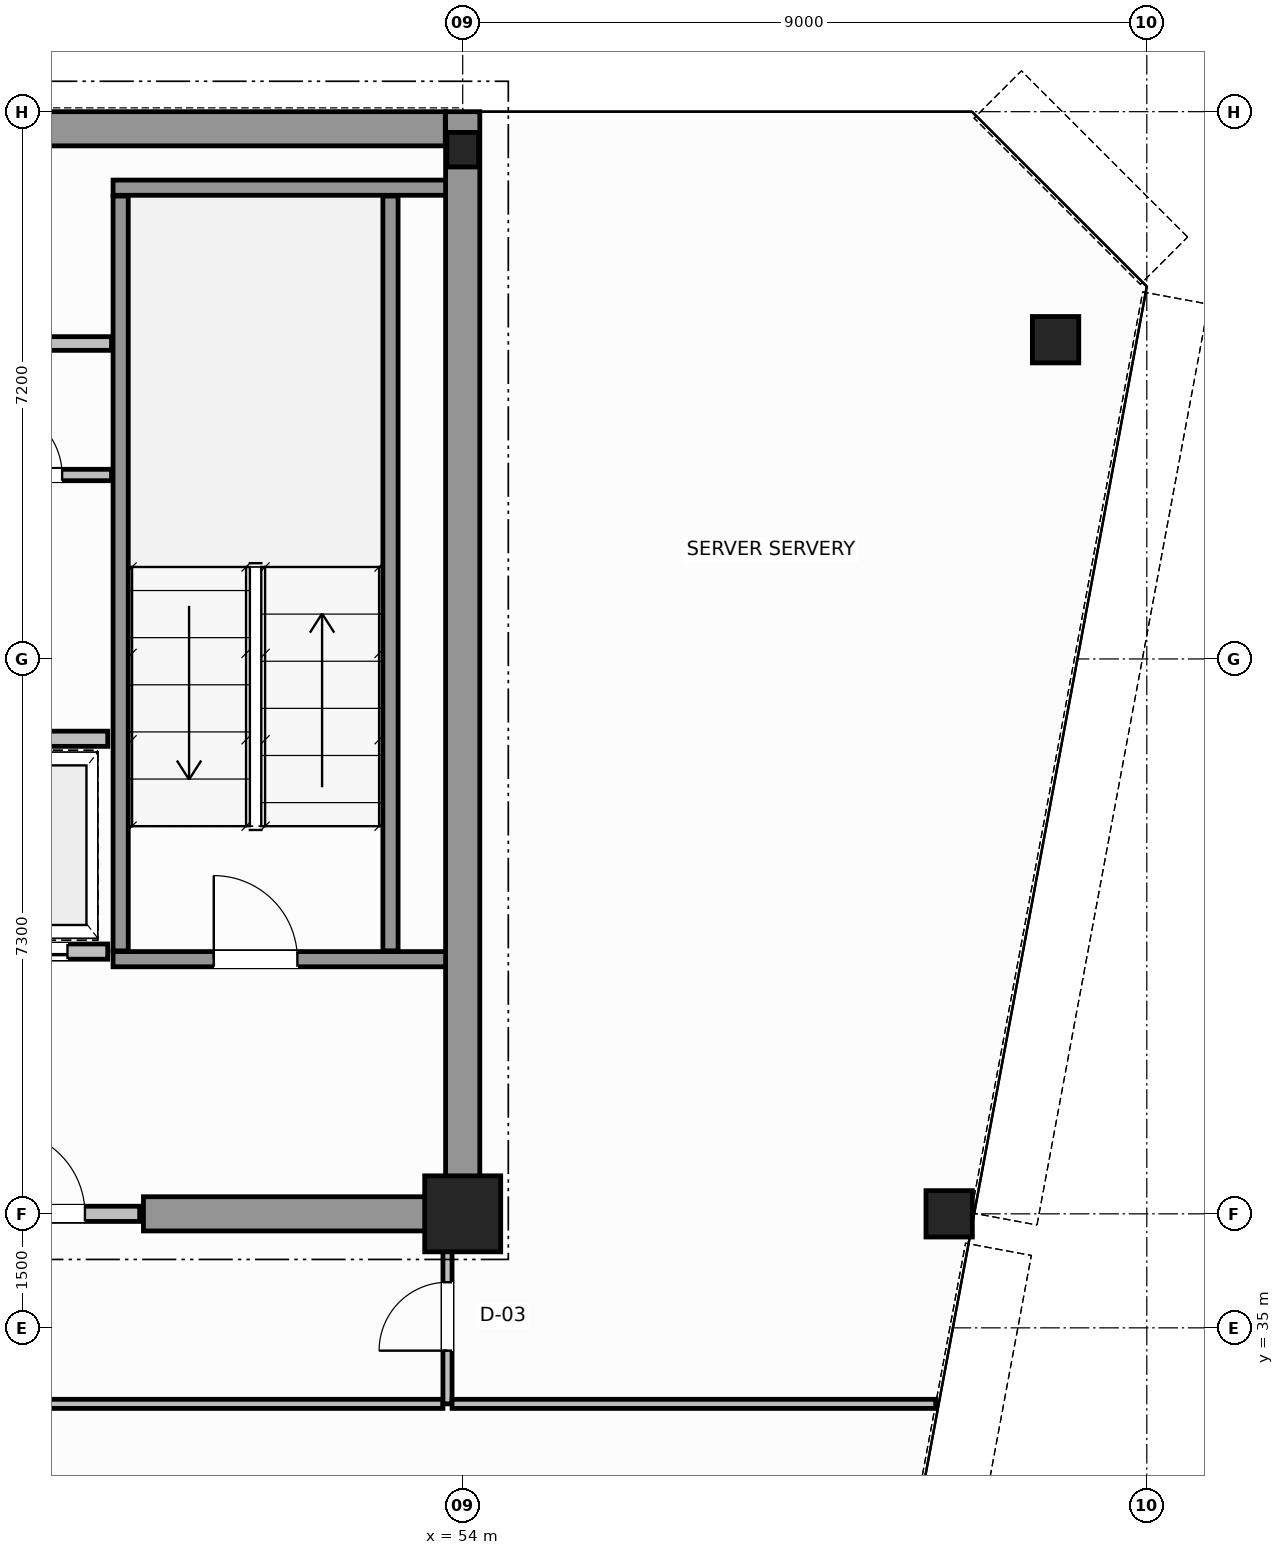
"""IFC4 building model, lengths in metres.
Left out: names, types, materials, properties, quantities, classifications, styles, units other than length and angle.
Written with IfcOpenShell. Run it as: python <this file> out.ifc"""

import sys

from ifc_helpers import new_model, si_unit, direction, frame, frame_2d, origin, origin_2d, place, context, subcontext, project, spatial, rectangle, hollow_circle, i_section, extrude, source, transform, mapped, element, fill, save


model = new_model("IFC4")
c1 = context("Model", 3, precision=1e-05, world=origin(), true_north=direction((0.0, 1.0)))
c2 = subcontext(c1, "Body", "Model", "MODEL_VIEW")
j1 = project(units=[si_unit("LENGTHUNIT", "METRE"), si_unit("PLANEANGLEUNIT", "RADIAN")], contexts=[c1])
p1 = place(None, origin())
s1 = spatial("IfcSite", under=j1, at=p1, CompositionType="ELEMENT")
p2 = place(p1, origin())
s2 = spatial("IfcBuilding", under=s1, at=p2, CompositionType="ELEMENT")
p3 = place(p2, frame((0.0, 0.0, 246.0)))
s3 = spatial("IfcBuildingStorey", under=s2, at=p3, CompositionType="ELEMENT", Elevation=246.0)
m1 = source(origin(), c2, "Body", "SweptSolid", [
    extrude(rectangle(XDim=1.0, YDim=1.0, at=origin_2d()), origin(), (0.0, 0.0, 1.0), 3.8),
])
p4 = place(p3, frame((54.0, 36.5, 0.0), z_axis=(0.0, 0.0, 1.0), x_axis=(1.0, 0.0, 0.0)))
e1 = element("IfcColumn", 1, at=p4, inside=s3, PredefinedType="COLUMN", context=c2, shape_type="MappedRepresentation", body=[
    mapped(m1, transform((0.0, 0.0, 0.0), scale=1.0)),
])
m2 = source(origin(), c2, "Body", "SweptSolid", [
    extrude(i_section(OverallWidth=0.418, OverallDepth=0.455, WebThickness=0.042, FlangeThickness=0.058, FilletRadius=0.015, at=origin_2d()), origin(), (0.0, 0.0, 1.0), 3.8),
])
p5 = place(p3, frame((54.0, 50.5, 0.0), z_axis=(0.0, 0.0, 1.0), x_axis=(1.0, 0.0, 0.0)))
e2 = element("IfcColumn", 2, at=p5, inside=s3, PredefinedType="COLUMN", context=c2, shape_type="MappedRepresentation", body=[
    mapped(m2, transform((0.0, 0.0, 0.0), scale=1.0)),
])
m3 = source(origin(), c2, "Body", "SweptSolid", [
    extrude(hollow_circle(Radius=0.305, WallThickness=0.03, at=origin_2d()), origin(), (0.0, 0.0, 1.0), 3.8),
])
for number, where, z_axis, x_axis in (
    (3, (61.8, 48.0, 0.0), (0.0, 0.0, 1.0), (1.0, 0.0, 0.0)),
    (4, (60.4, 36.5, 0.0), (0.0, 0.0, 1.0), (1.0, 0.0, 0.0)),
):
    element("IfcColumn", number, at=place(p3, frame(where, z_axis=z_axis, x_axis=x_axis)), inside=s3, PredefinedType="COLUMN", context=c2, shape_type="MappedRepresentation", body=[
        mapped(m3, transform((0.0, 0.0, 0.0), scale=1.0)),
    ])
p6 = place(p3, frame((34.002, 50.775, 0.0), z_axis=(0.0, 0.0, 1.0), x_axis=(1.0, 0.0, 0.0)))
e5 = element("IfcWall", 5, at=p6, inside=s3, PredefinedType="SHEAR", context=c2, shape_type="SweptSolid", body=[
    extrude(rectangle(XDim=19.769, YDim=0.45, at=frame_2d((9.885, 0.0))), origin(), (0.0, 0.0, 1.0), 3.8),
])
p7 = place(p3, frame((54.0, 36.5, 0.0), z_axis=(0.0, 0.0, 1.0), x_axis=(0.0, 1.0, 0.0)))
e6 = element("IfcWall", 6, at=p7, inside=s3, PredefinedType="SHEAR", context=c2, shape_type="SweptSolid", body=[
    extrude(rectangle(XDim=14.5, YDim=0.45, at=frame_2d((7.25, 0.0))), origin(), (0.0, 0.0, 1.0), 3.8),
])
p8 = place(p3, frame((49.8, 36.5, 0.0), z_axis=(0.0, 0.0, 1.0), x_axis=(1.0, 0.0, 0.0)))
e7 = element("IfcWall", 7, at=p8, inside=s3, PredefinedType="SHEAR", context=c2, shape_type="SweptSolid", body=[
    extrude(rectangle(XDim=3.955, YDim=0.45, at=frame_2d((1.978, 0.0))), origin(), (0.0, 0.0, 1.0), 2.58),
])
p9 = place(p3, frame((49.4, 39.85, 0.0), z_axis=(0.0, 0.0, 1.0), x_axis=(1.0, 0.0, 0.0)))
e8 = element("IfcWall", 8, at=p9, inside=s3, PredefinedType="SOLIDWALL", context=c2, shape_type="SweptSolid", body=[
    extrude(rectangle(XDim=4.375, YDim=0.2, at=frame_2d((2.188, 0.0))), origin(), (0.0, 0.0, 1.0), 3.8),
])
p10 = place(p9, frame((1.325, 0.0, 0.0)))
e9 = element("IfcOpeningElement", 9, at=p10, cuts=e8, PredefinedType="OPENING", context=c2, shape_type="SweptSolid", body=[
    extrude(rectangle(XDim=1.1, YDim=2.15, at=frame_2d((0.55, 1.075))), frame((0.0, 0.11, 0.0), z_axis=(0.0, -1.0, 0.0), x_axis=(1.0, 0.0, 0.0)), (0.0, 0.0, 1.0), 0.22),
])
p11 = place(p3, frame((49.4, 50.0, 0.0), z_axis=(0.0, 0.0, 1.0), x_axis=(1.0, 0.0, 0.0)))
e10 = element("IfcWall", 10, at=p11, inside=s3, PredefinedType="SOLIDWALL", context=c2, shape_type="SweptSolid", body=[
    extrude(rectangle(XDim=4.375, YDim=0.2, at=frame_2d((2.188, 0.0))), origin(), (0.0, 0.0, 1.0), 3.8),
])
for number, where, z_axis, x_axis in (
    (11, (49.5, 39.96, 0.0), (0.0, 0.0, 1.0), (0.0, 1.0, 0.0)),
    (12, (53.05, 39.96, 0.0), (0.0, 0.0, 1.0), (0.0, 1.0, 0.0)),
):
    element("IfcWall", number, at=place(p3, frame(where, z_axis=z_axis, x_axis=x_axis)), inside=s3, PredefinedType="SOLIDWALL", context=c2, shape_type="SweptSolid", body=[
        extrude(rectangle(XDim=9.93, YDim=0.2, at=frame_2d((4.965, 0.0))), origin(), (0.0, 0.0, 1.0), 3.8),
    ])
p12 = place(p3, frame((47.28, 36.5, 0.0), z_axis=(0.0, 0.0, 1.0), x_axis=(1.0, 0.0, 0.0)))
e13 = element("IfcWall", 13, at=p12, inside=s3, PredefinedType="SOLIDWALL", context=c2, shape_type="SweptSolid", body=[
    extrude(rectangle(XDim=2.47, YDim=0.2, at=frame_2d((1.235, 0.0))), origin(), (0.0, 0.0, 1.0), 2.57),
])
p13 = place(p12, frame((0.65, 0.0, 0.0)))
e14 = element("IfcOpeningElement", 14, at=p13, cuts=e13, PredefinedType="OPENING", context=c2, shape_type="SweptSolid", body=[
    extrude(rectangle(XDim=1.1, YDim=2.15, at=frame_2d((0.55, 1.075))), frame((0.0, 0.11, 0.0), z_axis=(0.0, -1.0, 0.0), x_axis=(1.0, 0.0, 0.0)), (0.0, 0.0, 1.0), 0.22),
])
p14 = place(p3, frame((47.17, 39.95, 0.0), z_axis=(0.0, 0.0, 1.0), x_axis=(1.0, 0.0, 0.0)))
e15 = element("IfcWall", 15, at=p14, inside=s3, PredefinedType="SOLIDWALL", context=c2, shape_type="SweptSolid", body=[
    extrude(rectangle(XDim=2.16, YDim=0.2, at=frame_2d((1.08, 0.0))), origin(), (0.0, 0.0, 1.0), 3.58),
])
p15 = place(p14, frame((0.53, 0.0, 0.0)))
e16 = element("IfcOpeningElement", 16, at=p15, cuts=e15, PredefinedType="OPENING", context=c2, shape_type="SweptSolid", body=[
    extrude(rectangle(XDim=1.1, YDim=2.15, at=frame_2d((0.55, 1.075))), frame((0.0, 0.11, 0.0), z_axis=(0.0, -1.0, 0.0), x_axis=(1.0, 0.0, 0.0)), (0.0, 0.0, 1.0), 0.22),
])
p16 = place(p3, frame((47.17, 42.75, 0.0), z_axis=(0.0, 0.0, 1.0), x_axis=(1.0, 0.0, 0.0)))
e17 = element("IfcWall", 17, at=p16, inside=s3, PredefinedType="SOLIDWALL", context=c2, shape_type="SweptSolid", body=[
    extrude(rectangle(XDim=2.16, YDim=0.2, at=frame_2d((1.08, 0.0))), origin(), (0.0, 0.0, 1.0), 3.58),
])
p17 = place(p3, frame((47.28, 46.22, 0.0), z_axis=(0.0, 0.0, 1.0), x_axis=(1.0, 0.0, 0.0)))
e18 = element("IfcWall", 18, at=p17, inside=s3, PredefinedType="PARTITIONING", context=c2, shape_type="SweptSolid", body=[
    extrude(rectangle(XDim=2.1, YDim=0.15, at=frame_2d((1.05, 0.0))), origin(), (0.0, 0.0, 1.0), 3.58),
])
p18 = place(p17, frame((0.55, 0.0, 0.0)))
e19 = element("IfcOpeningElement", 19, at=p18, cuts=e18, PredefinedType="OPENING", context=c2, shape_type="SweptSolid", body=[
    extrude(rectangle(XDim=0.9, YDim=2.1, at=frame_2d((0.45, 1.05))), frame((0.0, 0.085, 0.0), z_axis=(0.0, -1.0, 0.0), x_axis=(1.0, 0.0, 0.0)), (0.0, 0.0, 1.0), 0.17),
])
p19 = place(p3, frame((43.3, 47.95, 0.0), z_axis=(0.0, 0.0, 1.0), x_axis=(1.0, 0.0, 0.0)))
e20 = element("IfcWall", 20, at=p19, inside=s3, PredefinedType="PLUMBINGWALL", context=c2, shape_type="SweptSolid", body=[
    extrude(rectangle(XDim=6.08, YDim=0.18, at=frame_2d((3.04, 0.0))), origin(), (0.0, 0.0, 1.0), 3.58),
])
p20 = place(p19, frame((2.4, 0.0, 0.0)))
e21 = element("IfcOpeningElement", 21, at=p20, cuts=e20, PredefinedType="OPENING", context=c2, shape_type="SweptSolid", body=[
    extrude(rectangle(XDim=0.9, YDim=2.15, at=frame_2d((0.45, 1.075))), frame((0.0, 0.1, 0.0), z_axis=(0.0, -1.0, 0.0), x_axis=(1.0, 0.0, 0.0)), (0.0, 0.0, 1.0), 0.2),
])
p21 = place(p3, frame((37.66, 34.0, 0.0), z_axis=(0.0, 0.0, 1.0), x_axis=(1.0, 0.0, 0.0)))
e22 = element("IfcWall", 22, at=p21, inside=s3, PredefinedType="PARTITIONING", context=c2, shape_type="SweptSolid", body=[
    extrude(rectangle(XDim=16.08, YDim=0.12, at=frame_2d((8.04, 0.0))), origin(), (0.0, 0.0, 1.0), 3.58),
])
p22 = place(p3, frame((53.8, 34.0, 0.0), z_axis=(0.0, 0.0, 1.0), x_axis=(0.0, 1.0, 0.0)))
e23 = element("IfcWall", 23, at=p22, inside=s3, PredefinedType="PARTITIONING", context=c2, shape_type="SweptSolid", body=[
    extrude(rectangle(XDim=2.44, YDim=0.12, at=frame_2d((1.22, 0.0))), origin(), (0.0, 0.0, 1.0), 3.58),
])
p23 = place(p22, frame((0.7, 0.0, 0.0)))
e24 = element("IfcOpeningElement", 24, at=p23, cuts=e23, PredefinedType="OPENING", context=c2, shape_type="SweptSolid", body=[
    extrude(rectangle(XDim=0.9, YDim=2.15, at=frame_2d((0.45, 1.075))), frame((0.0, 0.07, 0.0), z_axis=(0.0, -1.0, 0.0), x_axis=(1.0, 0.0, 0.0)), (0.0, 0.0, 1.0), 0.14),
])
p24 = place(p3, frame((53.86, 34.0, 0.0), z_axis=(0.0, 0.0, 1.0), x_axis=(1.0, 0.0, 0.0)))
e25 = element("IfcWall", 25, at=p24, inside=s3, PredefinedType="PARTITIONING", context=c2, shape_type="SweptSolid", body=[
    extrude(rectangle(XDim=6.363, YDim=0.12, at=frame_2d((3.181, 0.0))), origin(), (0.0, 0.0, 1.0), 3.58),
])
m4 = source(origin(), c2, "Body", "SweptSolid", [
    extrude(rectangle(XDim=1.1, YDim=2.15, at=frame_2d((0.55, 1.075))), frame((0.0, 0.025, 0.0), z_axis=(0.0, -1.0, 0.0), x_axis=(1.0, 0.0, 0.0)), (0.0, 0.0, 1.0), 0.05),
])
p25 = place(p10, origin())
e26 = element("IfcDoor", 26, at=p25, inside=s3, OperationType="SINGLE_SWING_RIGHT", PredefinedType="DOOR", context=c2, shape_type="MappedRepresentation", body=[
    mapped(m4, transform((0.0, 0.0, 0.0), scale=1.0)),
])
fill(e9, e26)
p26 = place(p13, origin())
e27 = element("IfcDoor", 27, at=p26, inside=s3, OperationType="SINGLE_SWING_LEFT", PredefinedType="DOOR", context=c2, shape_type="MappedRepresentation", body=[
    mapped(m4, transform((0.0, 0.0, 0.0), scale=1.0)),
])
fill(e14, e27)
p27 = place(p15, origin())
e28 = element("IfcDoor", 28, at=p27, inside=s3, OperationType="DOUBLE_DOOR_SLIDING", PredefinedType="DOOR", context=c2, shape_type="MappedRepresentation", body=[
    mapped(m4, transform((0.0, 0.0, 0.0), scale=1.0)),
])
fill(e16, e28)
m5 = source(origin(), c2, "Body", "SweptSolid", [
    extrude(rectangle(XDim=0.9, YDim=2.1, at=frame_2d((0.45, 1.05))), frame((0.0, 0.025, 0.0), z_axis=(0.0, -1.0, 0.0), x_axis=(1.0, 0.0, 0.0)), (0.0, 0.0, 1.0), 0.05),
])
p28 = place(p18, origin())
e29 = element("IfcDoor", 29, at=p28, inside=s3, OperationType="SINGLE_SWING_RIGHT", PredefinedType="DOOR", context=c2, shape_type="MappedRepresentation", body=[
    mapped(m5, transform((0.0, 0.0, 0.0), scale=1.0)),
])
fill(e19, e29)
m6 = source(origin(), c2, "Body", "SweptSolid", [
    extrude(rectangle(XDim=0.9, YDim=2.15, at=frame_2d((0.45, 1.075))), frame((0.0, 0.025, 0.0), z_axis=(0.0, -1.0, 0.0), x_axis=(1.0, 0.0, 0.0)), (0.0, 0.0, 1.0), 0.05),
])
p29 = place(p23, origin())
e30 = element("IfcDoor", 30, at=p29, inside=s3, OperationType="SINGLE_SWING_RIGHT", PredefinedType="DOOR", context=c2, shape_type="MappedRepresentation", body=[
    mapped(m6, transform((0.0, 0.0, 0.0), scale=1.0)),
])
fill(e24, e30)
save(model, sys.argv[1])
